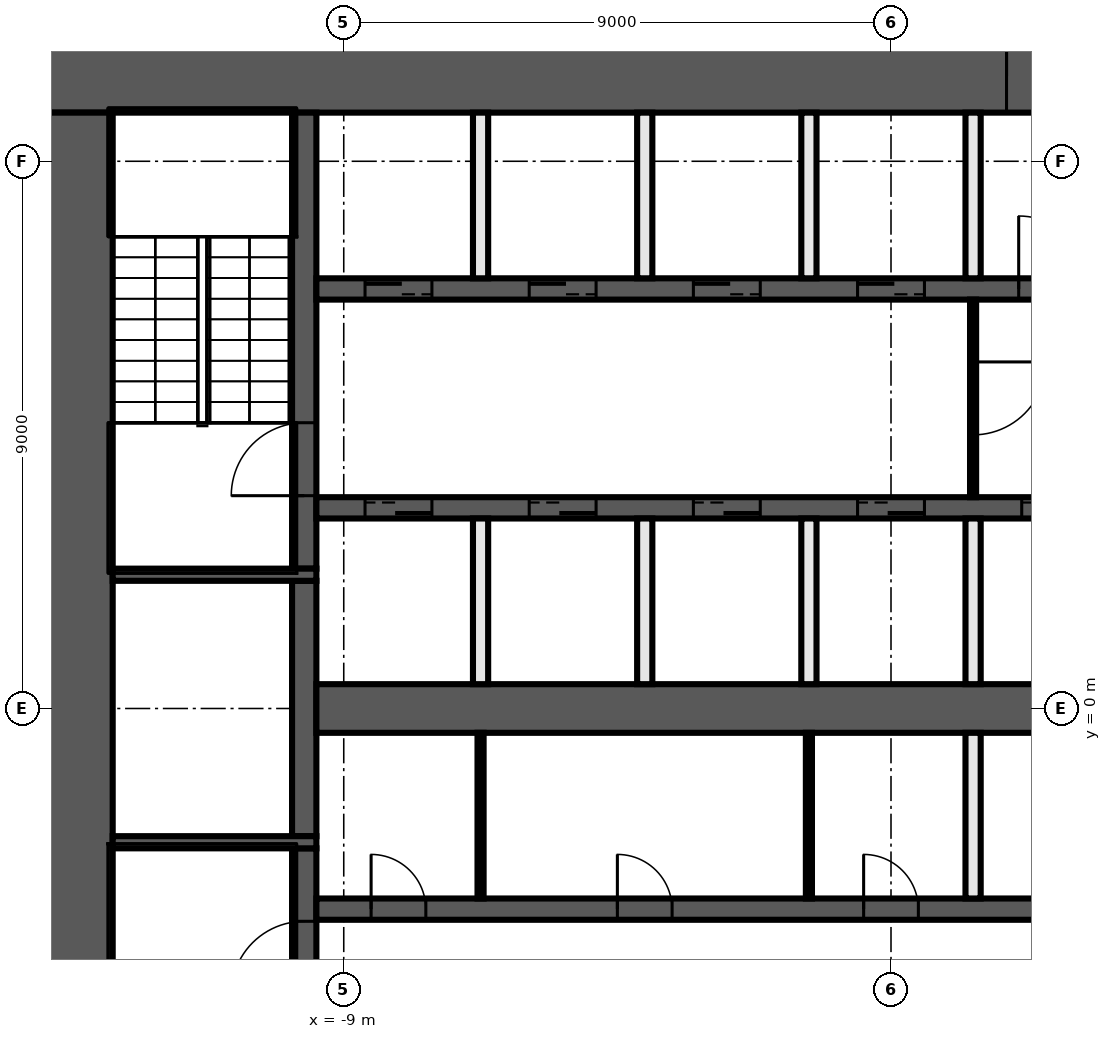
"""IFC4 building model, lengths in metres.
Left out: names, types, materials, properties, quantities, classifications, styles, units other than length and angle.
Written with IfcOpenShell. Run it as: python <this file> out.ifc"""

import sys

from ifc_helpers import new_model, si_unit, direction, frame, frame_2d, origin, place, context, subcontext, project, spatial, rectangle, extrude, element, fill, save


model = new_model("IFC4")
c1 = context("Model", 3, precision=1e-05, world=origin(), true_north=direction((0.0, 1.0)))
c2 = subcontext(c1, "Body", "Model", "MODEL_VIEW")
j1 = project(units=[si_unit("LENGTHUNIT", "METRE"), si_unit("PLANEANGLEUNIT", "RADIAN")], contexts=[c1])
p1 = place(None, origin())
s1 = spatial("IfcSite", under=j1, at=p1, CompositionType="ELEMENT")
p2 = place(p1, origin())
s2 = spatial("IfcBuilding", under=s1, at=p2, CompositionType="ELEMENT")
p3 = place(p2, frame((0.0, 0.0, 9.0)))
s3 = spatial("IfcBuildingStorey", under=s2, at=p3, CompositionType="ELEMENT", Elevation=9.0)
p4 = place(p3, frame((-14.0, 10.4, 0.0), z_axis=(0.0, 0.0, 1.0), x_axis=(1.0, 0.0, 0.0)))
e1 = element("IfcWall", 1, at=p4, inside=s3, PredefinedType="SHEAR", context=c2, shape_type="SweptSolid", body=[
    extrude(rectangle(XDim=28.0, YDim=1.2, at=frame_2d((14.0, 0.0))), origin(), (0.0, 0.0, 1.0), 9.55),
])
p5 = place(p4, frame((15.9, 0.0, 0.0)))
e2 = element("IfcOpeningElement", 2, at=p5, cuts=e1, PredefinedType="OPENING", context=c2, shape_type="SweptSolid", body=[
    extrude(rectangle(XDim=1.6, YDim=2.1, at=frame_2d((0.8, 1.05))), frame((0.0, 0.61, 0.0), z_axis=(0.0, -1.0, 0.0), x_axis=(1.0, 0.0, 0.0)), (0.0, 0.0, 1.0), 1.22),
])
p6 = place(p3, frame((-13.4, -9.8, 0.0), z_axis=(0.0, 0.0, 1.0), x_axis=(0.0, 1.0, 0.0)))
e3 = element("IfcWall", 3, at=p6, inside=s3, PredefinedType="SHEAR", context=c2, shape_type="SweptSolid", body=[
    extrude(rectangle(XDim=19.6, YDim=1.2, at=frame_2d((9.8, 0.0))), origin(), (0.0, 0.0, 1.0), 9.55),
])
p7 = place(p3, frame((-9.65, -9.8, 0.0), z_axis=(0.0, 0.0, 1.0), x_axis=(0.0, 1.0, 0.0)))
e4 = element("IfcWall", 4, at=p7, inside=s3, PredefinedType="SHEAR", context=c2, shape_type="SweptSolid", body=[
    extrude(rectangle(XDim=7.5, YDim=0.4, at=frame_2d((3.75, 0.0))), origin(), (0.0, 0.0, 1.0), 9.55),
])
p8 = place(p7, frame((5.1, 0.0, 0.0)))
e5 = element("IfcOpeningElement", 5, at=p8, cuts=e4, PredefinedType="OPENING", context=c2, shape_type="SweptSolid", body=[
    extrude(rectangle(XDim=1.2, YDim=2.1, at=frame_2d((0.6, 1.05))), frame((0.0, 0.21, 0.0), z_axis=(0.0, -1.0, 0.0), x_axis=(1.0, 0.0, 0.0)), (0.0, 0.0, 1.0), 0.42),
])
p9 = place(p3, frame((-9.65, -2.1, 0.0), z_axis=(0.0, 0.0, 1.0), x_axis=(0.0, 1.0, 0.0)))
e6 = element("IfcWall", 6, at=p9, inside=s3, PredefinedType="SHEAR", context=c2, shape_type="SweptSolid", body=[
    extrude(rectangle(XDim=4.2, YDim=0.4, at=frame_2d((2.1, 0.0))), origin(), (0.0, 0.0, 1.0), 9.55),
])
p10 = place(p3, frame((-9.65, 2.3, 0.0), z_axis=(0.0, 0.0, 1.0), x_axis=(0.0, 1.0, 0.0)))
e7 = element("IfcWall", 7, at=p10, inside=s3, PredefinedType="SHEAR", context=c2, shape_type="SweptSolid", body=[
    extrude(rectangle(XDim=7.5, YDim=0.4, at=frame_2d((3.75, 0.0))), origin(), (0.0, 0.0, 1.0), 9.55),
])
p11 = place(p10, frame((1.2, 0.0, 0.0)))
e8 = element("IfcOpeningElement", 8, at=p11, cuts=e7, PredefinedType="OPENING", context=c2, shape_type="SweptSolid", body=[
    extrude(rectangle(XDim=1.2, YDim=2.1, at=frame_2d((0.6, 1.05))), frame((0.0, 0.21, 0.0), z_axis=(0.0, -1.0, 0.0), x_axis=(1.0, 0.0, 0.0)), (0.0, 0.0, 1.0), 0.42),
])
for number, where, z_axis, x_axis in (
    (9, (-9.45, 2.2, 0.0), (0.0, 0.0, 1.0), (-1.0, 0.0, 0.0)),
    (10, (-9.45, -2.2, 0.0), (0.0, 0.0, 1.0), (-1.0, 0.0, 0.0)),
):
    element("IfcWall", number, at=place(p3, frame(where, z_axis=z_axis, x_axis=x_axis)), inside=s3, PredefinedType="SHEAR", context=c2, shape_type="SweptSolid", body=[
        extrude(rectangle(XDim=3.35, YDim=0.2, at=frame_2d((1.675, 0.0))), origin(), (0.0, 0.0, 1.0), 9.55),
    ])
p12 = place(p3, frame((-9.45, 6.9, 0.0), z_axis=(0.0, 0.0, 1.0), x_axis=(1.0, 0.0, 0.0)))
e11 = element("IfcWall", 11, at=p12, inside=s3, PredefinedType="SHEAR", context=c2, shape_type="SweptSolid", body=[
    extrude(rectangle(XDim=18.9, YDim=0.35, at=frame_2d((9.45, 0.0))), origin(), (0.0, 0.0, 1.0), 9.55),
])
p13 = place(p12, frame((0.8, 0.0, 0.0)))
e12 = element("IfcOpeningElement", 12, at=p13, cuts=e11, PredefinedType="OPENING", context=c2, shape_type="SweptSolid", body=[
    extrude(rectangle(XDim=1.1, YDim=2.1, at=frame_2d((0.55, 1.05))), frame((0.0, 0.185, 0.0), z_axis=(0.0, -1.0, 0.0), x_axis=(1.0, 0.0, 0.0)), (0.0, 0.0, 1.0), 0.37),
])
p14 = place(p12, frame((3.5, 0.0, 0.0)))
e13 = element("IfcOpeningElement", 13, at=p14, cuts=e11, PredefinedType="OPENING", context=c2, shape_type="SweptSolid", body=[
    extrude(rectangle(XDim=1.1, YDim=2.1, at=frame_2d((0.55, 1.05))), frame((0.0, 0.185, 0.0), z_axis=(0.0, -1.0, 0.0), x_axis=(1.0, 0.0, 0.0)), (0.0, 0.0, 1.0), 0.37),
])
p15 = place(p12, frame((6.2, 0.0, 0.0)))
e14 = element("IfcOpeningElement", 14, at=p15, cuts=e11, PredefinedType="OPENING", context=c2, shape_type="SweptSolid", body=[
    extrude(rectangle(XDim=1.1, YDim=2.1, at=frame_2d((0.55, 1.05))), frame((0.0, 0.185, 0.0), z_axis=(0.0, -1.0, 0.0), x_axis=(1.0, 0.0, 0.0)), (0.0, 0.0, 1.0), 0.37),
])
p16 = place(p12, frame((8.9, 0.0, 0.0)))
e15 = element("IfcOpeningElement", 15, at=p16, cuts=e11, PredefinedType="OPENING", context=c2, shape_type="SweptSolid", body=[
    extrude(rectangle(XDim=1.1, YDim=2.1, at=frame_2d((0.55, 1.05))), frame((0.0, 0.185, 0.0), z_axis=(0.0, -1.0, 0.0), x_axis=(1.0, 0.0, 0.0)), (0.0, 0.0, 1.0), 0.37),
])
p17 = place(p12, frame((11.55, 0.0, 0.0)))
e16 = element("IfcOpeningElement", 16, at=p17, cuts=e11, PredefinedType="OPENING", context=c2, shape_type="SweptSolid", body=[
    extrude(rectangle(XDim=1.2, YDim=2.1, at=frame_2d((0.6, 1.05))), frame((0.0, 0.185, 0.0), z_axis=(0.0, -1.0, 0.0), x_axis=(1.0, 0.0, 0.0)), (0.0, 0.0, 1.0), 0.37),
])
p18 = place(p12, frame((14.3, 0.0, 0.0)))
e17 = element("IfcOpeningElement", 17, at=p18, cuts=e11, PredefinedType="OPENING", context=c2, shape_type="SweptSolid", body=[
    extrude(rectangle(XDim=1.1, YDim=2.1, at=frame_2d((0.55, 1.05))), frame((0.0, 0.185, 0.0), z_axis=(0.0, -1.0, 0.0), x_axis=(1.0, 0.0, 0.0)), (0.0, 0.0, 1.0), 0.37),
])
p19 = place(p12, frame((17.0, 0.0, 0.0)))
e18 = element("IfcOpeningElement", 18, at=p19, cuts=e11, PredefinedType="OPENING", context=c2, shape_type="SweptSolid", body=[
    extrude(rectangle(XDim=1.1, YDim=2.1, at=frame_2d((0.55, 1.05))), frame((0.0, 0.185, 0.0), z_axis=(0.0, -1.0, 0.0), x_axis=(1.0, 0.0, 0.0)), (0.0, 0.0, 1.0), 0.37),
])
p20 = place(p3, frame((9.45, 3.3, 0.0), z_axis=(0.0, 0.0, 1.0), x_axis=(-1.0, 0.0, 0.0)))
e19 = element("IfcWall", 19, at=p20, inside=s3, PredefinedType="SHEAR", context=c2, shape_type="SweptSolid", body=[
    extrude(rectangle(XDim=18.9, YDim=0.35, at=frame_2d((9.45, 0.0))), origin(), (0.0, 0.0, 1.0), 9.55),
])
p21 = place(p20, frame((17.0, 0.0, 0.0)))
e20 = element("IfcOpeningElement", 20, at=p21, cuts=e19, PredefinedType="OPENING", context=c2, shape_type="SweptSolid", body=[
    extrude(rectangle(XDim=1.1, YDim=2.1, at=frame_2d((0.55, 1.05))), frame((0.0, 0.185, 0.0), z_axis=(0.0, -1.0, 0.0), x_axis=(1.0, 0.0, 0.0)), (0.0, 0.0, 1.0), 0.37),
])
p22 = place(p20, frame((14.3, 0.0, 0.0)))
e21 = element("IfcOpeningElement", 21, at=p22, cuts=e19, PredefinedType="OPENING", context=c2, shape_type="SweptSolid", body=[
    extrude(rectangle(XDim=1.1, YDim=2.1, at=frame_2d((0.55, 1.05))), frame((0.0, 0.185, 0.0), z_axis=(0.0, -1.0, 0.0), x_axis=(1.0, 0.0, 0.0)), (0.0, 0.0, 1.0), 0.37),
])
p23 = place(p20, frame((11.6, 0.0, 0.0)))
e22 = element("IfcOpeningElement", 22, at=p23, cuts=e19, PredefinedType="OPENING", context=c2, shape_type="SweptSolid", body=[
    extrude(rectangle(XDim=1.1, YDim=2.1, at=frame_2d((0.55, 1.05))), frame((0.0, 0.185, 0.0), z_axis=(0.0, -1.0, 0.0), x_axis=(1.0, 0.0, 0.0)), (0.0, 0.0, 1.0), 0.37),
])
p24 = place(p20, frame((8.9, 0.0, 0.0)))
e23 = element("IfcOpeningElement", 23, at=p24, cuts=e19, PredefinedType="OPENING", context=c2, shape_type="SweptSolid", body=[
    extrude(rectangle(XDim=1.1, YDim=2.1, at=frame_2d((0.55, 1.05))), frame((0.0, 0.185, 0.0), z_axis=(0.0, -1.0, 0.0), x_axis=(1.0, 0.0, 0.0)), (0.0, 0.0, 1.0), 0.37),
])
p25 = place(p20, frame((6.2, 0.0, 0.0)))
e24 = element("IfcOpeningElement", 24, at=p25, cuts=e19, PredefinedType="OPENING", context=c2, shape_type="SweptSolid", body=[
    extrude(rectangle(XDim=1.1, YDim=2.1, at=frame_2d((0.55, 1.05))), frame((0.0, 0.185, 0.0), z_axis=(0.0, -1.0, 0.0), x_axis=(1.0, 0.0, 0.0)), (0.0, 0.0, 1.0), 0.37),
])
p26 = place(p20, frame((3.5, 0.0, 0.0)))
e25 = element("IfcOpeningElement", 25, at=p26, cuts=e19, PredefinedType="OPENING", context=c2, shape_type="SweptSolid", body=[
    extrude(rectangle(XDim=1.1, YDim=2.1, at=frame_2d((0.55, 1.05))), frame((0.0, 0.185, 0.0), z_axis=(0.0, -1.0, 0.0), x_axis=(1.0, 0.0, 0.0)), (0.0, 0.0, 1.0), 0.37),
])
p27 = place(p20, frame((0.9, 0.0, 0.0)))
e26 = element("IfcOpeningElement", 26, at=p27, cuts=e19, PredefinedType="OPENING", context=c2, shape_type="SweptSolid", body=[
    extrude(rectangle(XDim=0.9, YDim=2.1, at=frame_2d((0.45, 1.05))), frame((0.0, 0.185, 0.0), z_axis=(0.0, -1.0, 0.0), x_axis=(1.0, 0.0, 0.0)), (0.0, 0.0, 1.0), 0.37),
])
p28 = place(p3, frame((-9.45, -3.3, 0.0), z_axis=(0.0, 0.0, 1.0), x_axis=(1.0, 0.0, 0.0)))
e27 = element("IfcWall", 27, at=p28, inside=s3, PredefinedType="SHEAR", context=c2, shape_type="SweptSolid", body=[
    extrude(rectangle(XDim=18.9, YDim=0.35, at=frame_2d((9.45, 0.0))), origin(), (0.0, 0.0, 1.0), 9.55),
])
p29 = place(p28, frame((17.0, 0.0, 0.0)))
e28 = element("IfcOpeningElement", 28, at=p29, cuts=e27, PredefinedType="OPENING", context=c2, shape_type="SweptSolid", body=[
    extrude(rectangle(XDim=1.1, YDim=2.1, at=frame_2d((0.55, 1.05))), frame((0.0, 0.185, 0.0), z_axis=(0.0, -1.0, 0.0), x_axis=(1.0, 0.0, 0.0)), (0.0, 0.0, 1.0), 0.37),
])
p30 = place(p28, frame((0.9, 0.0, 0.0)))
e29 = element("IfcOpeningElement", 29, at=p30, cuts=e27, PredefinedType="OPENING", context=c2, shape_type="SweptSolid", body=[
    extrude(rectangle(XDim=0.9, YDim=2.1, at=frame_2d((0.45, 1.05))), frame((0.0, 0.185, 0.0), z_axis=(0.0, -1.0, 0.0), x_axis=(1.0, 0.0, 0.0)), (0.0, 0.0, 1.0), 0.37),
])
p31 = place(p28, frame((4.95, 0.0, 0.0)))
e30 = element("IfcOpeningElement", 30, at=p31, cuts=e27, PredefinedType="OPENING", context=c2, shape_type="SweptSolid", body=[
    extrude(rectangle(XDim=0.9, YDim=2.1, at=frame_2d((0.45, 1.05))), frame((0.0, 0.185, 0.0), z_axis=(0.0, -1.0, 0.0), x_axis=(1.0, 0.0, 0.0)), (0.0, 0.0, 1.0), 0.37),
])
p32 = place(p28, frame((9.0, 0.0, 0.0)))
e31 = element("IfcOpeningElement", 31, at=p32, cuts=e27, PredefinedType="OPENING", context=c2, shape_type="SweptSolid", body=[
    extrude(rectangle(XDim=0.9, YDim=2.1, at=frame_2d((0.45, 1.05))), frame((0.0, 0.185, 0.0), z_axis=(0.0, -1.0, 0.0), x_axis=(1.0, 0.0, 0.0)), (0.0, 0.0, 1.0), 0.37),
])
p33 = place(p3, frame((-9.45, 0.0, 0.0), z_axis=(0.0, 0.0, 1.0), x_axis=(1.0, 0.0, 0.0)))
e32 = element("IfcWall", 32, at=p33, inside=s3, PredefinedType="SHEAR", context=c2, shape_type="SweptSolid", body=[
    extrude(rectangle(XDim=18.9, YDim=0.8, at=frame_2d((9.45, 0.0))), origin(), (0.0, 0.0, 1.0), 9.55),
])
p34 = place(p3, frame((1.35, 6.725, 0.0), z_axis=(0.0, 0.0, 1.0), x_axis=(0.0, -1.0, 0.0)))
e33 = element("IfcWall", 33, at=p34, inside=s3, PredefinedType="PARTITIONING", context=c2, shape_type="SweptSolid", body=[
    extrude(rectangle(XDim=3.25, YDim=0.1, at=frame_2d((1.625, 0.0))), origin(), (0.0, 0.0, 1.0), 9.55),
])
p35 = place(p34, frame((1.025, 0.0, 0.0)))
e34 = element("IfcOpeningElement", 34, at=p35, cuts=e33, PredefinedType="OPENING", context=c2, shape_type="SweptSolid", body=[
    extrude(rectangle(XDim=1.2, YDim=2.1, at=frame_2d((0.6, 1.05))), frame((0.0, 0.06, 0.0), z_axis=(0.0, -1.0, 0.0), x_axis=(1.0, 0.0, 0.0)), (0.0, 0.0, 1.0), 0.12),
])
for number, where, z_axis, x_axis in (
    (35, (1.35, -3.125, 0.0), (0.0, 0.0, 1.0), (0.0, 1.0, 0.0)),
    (36, (1.35, 0.4, 0.0), (0.0, 0.0, 1.0), (0.0, 1.0, 0.0)),
    (37, (1.35, 7.075, 0.0), (0.0, 0.0, 1.0), (0.0, 1.0, 0.0)),
):
    element("IfcWall", number, at=place(p3, frame(where, z_axis=z_axis, x_axis=x_axis)), inside=s3, PredefinedType="SOLIDWALL", context=c2, shape_type="SweptSolid", body=[
        extrude(rectangle(XDim=2.725, YDim=0.25, at=frame_2d((1.363, 0.0))), origin(), (0.0, 0.0, 1.0), 9.55),
    ])
p36 = place(p3, frame((-1.35, -3.125, 0.0), z_axis=(0.0, 0.0, 1.0), x_axis=(0.0, 1.0, 0.0)))
e38 = element("IfcWall", 38, at=p36, inside=s3, PredefinedType="PARTITIONING", context=c2, shape_type="SweptSolid", body=[
    extrude(rectangle(XDim=2.725, YDim=0.1, at=frame_2d((1.363, 0.0))), origin(), (0.0, 0.0, 1.0), 9.55),
])
for number, where, z_axis, x_axis in (
    (39, (-1.35, 0.4, 0.0), (0.0, 0.0, 1.0), (0.0, 1.0, 0.0)),
    (40, (-1.35, 7.075, 0.0), (0.0, 0.0, 1.0), (0.0, 1.0, 0.0)),
    (41, (-4.05, 0.4, 0.0), (0.0, 0.0, 1.0), (0.0, 1.0, 0.0)),
    (42, (-4.05, 7.075, 0.0), (0.0, 0.0, 1.0), (0.0, 1.0, 0.0)),
):
    element("IfcWall", number, at=place(p3, frame(where, z_axis=z_axis, x_axis=x_axis)), inside=s3, PredefinedType="SOLIDWALL", context=c2, shape_type="SweptSolid", body=[
        extrude(rectangle(XDim=2.725, YDim=0.25, at=frame_2d((1.363, 0.0))), origin(), (0.0, 0.0, 1.0), 9.55),
    ])
p37 = place(p3, frame((-6.75, -3.125, 0.0), z_axis=(0.0, 0.0, 1.0), x_axis=(0.0, 1.0, 0.0)))
e43 = element("IfcWall", 43, at=p37, inside=s3, PredefinedType="PARTITIONING", context=c2, shape_type="SweptSolid", body=[
    extrude(rectangle(XDim=2.725, YDim=0.1, at=frame_2d((1.363, 0.0))), origin(), (0.0, 0.0, 1.0), 9.55),
])
for number, where, z_axis, x_axis in (
    (44, (-6.75, 0.4, 0.0), (0.0, 0.0, 1.0), (0.0, 1.0, 0.0)),
    (45, (-6.75, 7.075, 0.0), (0.0, 0.0, 1.0), (0.0, 1.0, 0.0)),
):
    element("IfcWall", number, at=place(p3, frame(where, z_axis=z_axis, x_axis=x_axis)), inside=s3, PredefinedType="SOLIDWALL", context=c2, shape_type="SweptSolid", body=[
        extrude(rectangle(XDim=2.725, YDim=0.25, at=frame_2d((1.363, 0.0))), origin(), (0.0, 0.0, 1.0), 9.55),
    ])
p38 = place(p13, origin())
e46 = element("IfcDoor", 46, at=p38, inside=s3, OperationType="DOUBLE_DOOR_SLIDING", PredefinedType="DOOR", context=c2, shape_type="SweptSolid", body=[
    extrude(rectangle(XDim=1.1, YDim=2.1, at=frame_2d((0.55, 1.05))), frame((0.0, 0.025, 0.0), z_axis=(0.0, -1.0, 0.0), x_axis=(1.0, 0.0, 0.0)), (0.0, 0.0, 1.0), 0.05),
])
fill(e12, e46)
p39 = place(p14, origin())
e47 = element("IfcDoor", 47, at=p39, inside=s3, OperationType="DOUBLE_DOOR_SLIDING", PredefinedType="DOOR", context=c2, shape_type="SweptSolid", body=[
    extrude(rectangle(XDim=1.1, YDim=2.1, at=frame_2d((0.55, 1.05))), frame((0.0, 0.025, 0.0), z_axis=(0.0, -1.0, 0.0), x_axis=(1.0, 0.0, 0.0)), (0.0, 0.0, 1.0), 0.05),
])
fill(e13, e47)
p40 = place(p15, origin())
e48 = element("IfcDoor", 48, at=p40, inside=s3, OperationType="DOUBLE_DOOR_SLIDING", PredefinedType="DOOR", context=c2, shape_type="SweptSolid", body=[
    extrude(rectangle(XDim=1.1, YDim=2.1, at=frame_2d((0.55, 1.05))), frame((0.0, 0.025, 0.0), z_axis=(0.0, -1.0, 0.0), x_axis=(1.0, 0.0, 0.0)), (0.0, 0.0, 1.0), 0.05),
])
fill(e14, e48)
p41 = place(p16, origin())
e49 = element("IfcDoor", 49, at=p41, inside=s3, OperationType="DOUBLE_DOOR_SLIDING", PredefinedType="DOOR", context=c2, shape_type="SweptSolid", body=[
    extrude(rectangle(XDim=1.1, YDim=2.1, at=frame_2d((0.55, 1.05))), frame((0.0, 0.025, 0.0), z_axis=(0.0, -1.0, 0.0), x_axis=(1.0, 0.0, 0.0)), (0.0, 0.0, 1.0), 0.05),
])
fill(e15, e49)
p42 = place(p5, origin())
e50 = element("IfcDoor", 50, at=p42, inside=s3, OperationType="DOUBLE_DOOR_SINGLE_SWING", PredefinedType="DOOR", context=c2, shape_type="SweptSolid", body=[
    extrude(rectangle(XDim=1.6, YDim=2.1, at=frame_2d((0.8, 1.05))), frame((0.0, 0.025, 0.0), z_axis=(0.0, -1.0, 0.0), x_axis=(1.0, 0.0, 0.0)), (0.0, 0.0, 1.0), 0.05),
])
fill(e2, e50)
p43 = place(p17, origin())
e51 = element("IfcDoor", 51, at=p43, inside=s3, OperationType="SINGLE_SWING_LEFT", PredefinedType="DOOR", context=c2, shape_type="SweptSolid", body=[
    extrude(rectangle(XDim=1.2, YDim=2.1, at=frame_2d((0.6, 1.05))), frame((0.0, 0.025, 0.0), z_axis=(0.0, -1.0, 0.0), x_axis=(1.0, 0.0, 0.0)), (0.0, 0.0, 1.0), 0.05),
])
fill(e16, e51)
p44 = place(p21, origin())
e52 = element("IfcDoor", 52, at=p44, inside=s3, OperationType="DOUBLE_DOOR_SLIDING", PredefinedType="DOOR", context=c2, shape_type="SweptSolid", body=[
    extrude(rectangle(XDim=1.1, YDim=2.1, at=frame_2d((0.55, 1.05))), frame((0.0, 0.025, 0.0), z_axis=(0.0, -1.0, 0.0), x_axis=(1.0, 0.0, 0.0)), (0.0, 0.0, 1.0), 0.05),
])
fill(e20, e52)
p45 = place(p22, origin())
e53 = element("IfcDoor", 53, at=p45, inside=s3, OperationType="DOUBLE_DOOR_SLIDING", PredefinedType="DOOR", context=c2, shape_type="SweptSolid", body=[
    extrude(rectangle(XDim=1.1, YDim=2.1, at=frame_2d((0.55, 1.05))), frame((0.0, 0.025, 0.0), z_axis=(0.0, -1.0, 0.0), x_axis=(1.0, 0.0, 0.0)), (0.0, 0.0, 1.0), 0.05),
])
fill(e21, e53)
p46 = place(p23, origin())
e54 = element("IfcDoor", 54, at=p46, inside=s3, OperationType="DOUBLE_DOOR_SLIDING", PredefinedType="DOOR", context=c2, shape_type="SweptSolid", body=[
    extrude(rectangle(XDim=1.1, YDim=2.1, at=frame_2d((0.55, 1.05))), frame((0.0, 0.025, 0.0), z_axis=(0.0, -1.0, 0.0), x_axis=(1.0, 0.0, 0.0)), (0.0, 0.0, 1.0), 0.05),
])
fill(e22, e54)
p47 = place(p24, origin())
e55 = element("IfcDoor", 55, at=p47, inside=s3, OperationType="DOUBLE_DOOR_SLIDING", PredefinedType="DOOR", context=c2, shape_type="SweptSolid", body=[
    extrude(rectangle(XDim=1.1, YDim=2.1, at=frame_2d((0.55, 1.05))), frame((0.0, 0.025, 0.0), z_axis=(0.0, -1.0, 0.0), x_axis=(1.0, 0.0, 0.0)), (0.0, 0.0, 1.0), 0.05),
])
fill(e23, e55)
p48 = place(p25, origin())
e56 = element("IfcDoor", 56, at=p48, inside=s3, OperationType="DOUBLE_DOOR_SLIDING", PredefinedType="DOOR", context=c2, shape_type="SweptSolid", body=[
    extrude(rectangle(XDim=1.1, YDim=2.1, at=frame_2d((0.55, 1.05))), frame((0.0, 0.025, 0.0), z_axis=(0.0, -1.0, 0.0), x_axis=(1.0, 0.0, 0.0)), (0.0, 0.0, 1.0), 0.05),
])
fill(e24, e56)
p49 = place(p30, origin())
e57 = element("IfcDoor", 57, at=p49, inside=s3, OperationType="SINGLE_SWING_RIGHT", PredefinedType="DOOR", context=c2, shape_type="SweptSolid", body=[
    extrude(rectangle(XDim=0.9, YDim=2.1, at=frame_2d((0.45, 1.05))), frame((0.0, 0.025, 0.0), z_axis=(0.0, -1.0, 0.0), x_axis=(1.0, 0.0, 0.0)), (0.0, 0.0, 1.0), 0.05),
])
fill(e29, e57)
p50 = place(p31, origin())
e58 = element("IfcDoor", 58, at=p50, inside=s3, OperationType="SINGLE_SWING_LEFT", PredefinedType="DOOR", context=c2, shape_type="SweptSolid", body=[
    extrude(rectangle(XDim=0.9, YDim=2.1, at=frame_2d((0.45, 1.05))), frame((0.0, 0.025, 0.0), z_axis=(0.0, -1.0, 0.0), x_axis=(1.0, 0.0, 0.0)), (0.0, 0.0, 1.0), 0.05),
])
fill(e30, e58)
p51 = place(p32, origin())
e59 = element("IfcDoor", 59, at=p51, inside=s3, OperationType="SINGLE_SWING_RIGHT", PredefinedType="DOOR", context=c2, shape_type="SweptSolid", body=[
    extrude(rectangle(XDim=0.9, YDim=2.1, at=frame_2d((0.45, 1.05))), frame((0.0, 0.025, 0.0), z_axis=(0.0, -1.0, 0.0), x_axis=(1.0, 0.0, 0.0)), (0.0, 0.0, 1.0), 0.05),
])
fill(e31, e59)
p52 = place(p11, origin())
e60 = element("IfcDoor", 60, at=p52, inside=s3, OperationType="SINGLE_SWING_RIGHT", PredefinedType="DOOR", context=c2, shape_type="SweptSolid", body=[
    extrude(rectangle(XDim=1.2, YDim=2.1, at=frame_2d((0.6, 1.05))), frame((0.0, 0.025, 0.0), z_axis=(0.0, -1.0, 0.0), x_axis=(1.0, 0.0, 0.0)), (0.0, 0.0, 1.0), 0.05),
])
fill(e8, e60)
p53 = place(p8, origin())
e61 = element("IfcDoor", 61, at=p53, inside=s3, OperationType="SINGLE_SWING_LEFT", PredefinedType="DOOR", context=c2, shape_type="SweptSolid", body=[
    extrude(rectangle(XDim=1.2, YDim=2.1, at=frame_2d((0.6, 1.05))), frame((0.0, 0.025, 0.0), z_axis=(0.0, -1.0, 0.0), x_axis=(1.0, 0.0, 0.0)), (0.0, 0.0, 1.0), 0.05),
])
fill(e5, e61)
p54 = place(p35, origin())
e62 = element("IfcDoor", 62, at=p54, inside=s3, OperationType="SINGLE_SWING_LEFT", PredefinedType="DOOR", context=c2, shape_type="SweptSolid", body=[
    extrude(rectangle(XDim=1.2, YDim=2.1, at=frame_2d((0.6, 1.05))), frame((0.0, 0.025, 0.0), z_axis=(0.0, -1.0, 0.0), x_axis=(1.0, 0.0, 0.0)), (0.0, 0.0, 1.0), 0.05),
])
fill(e34, e62)
save(model, sys.argv[1])
